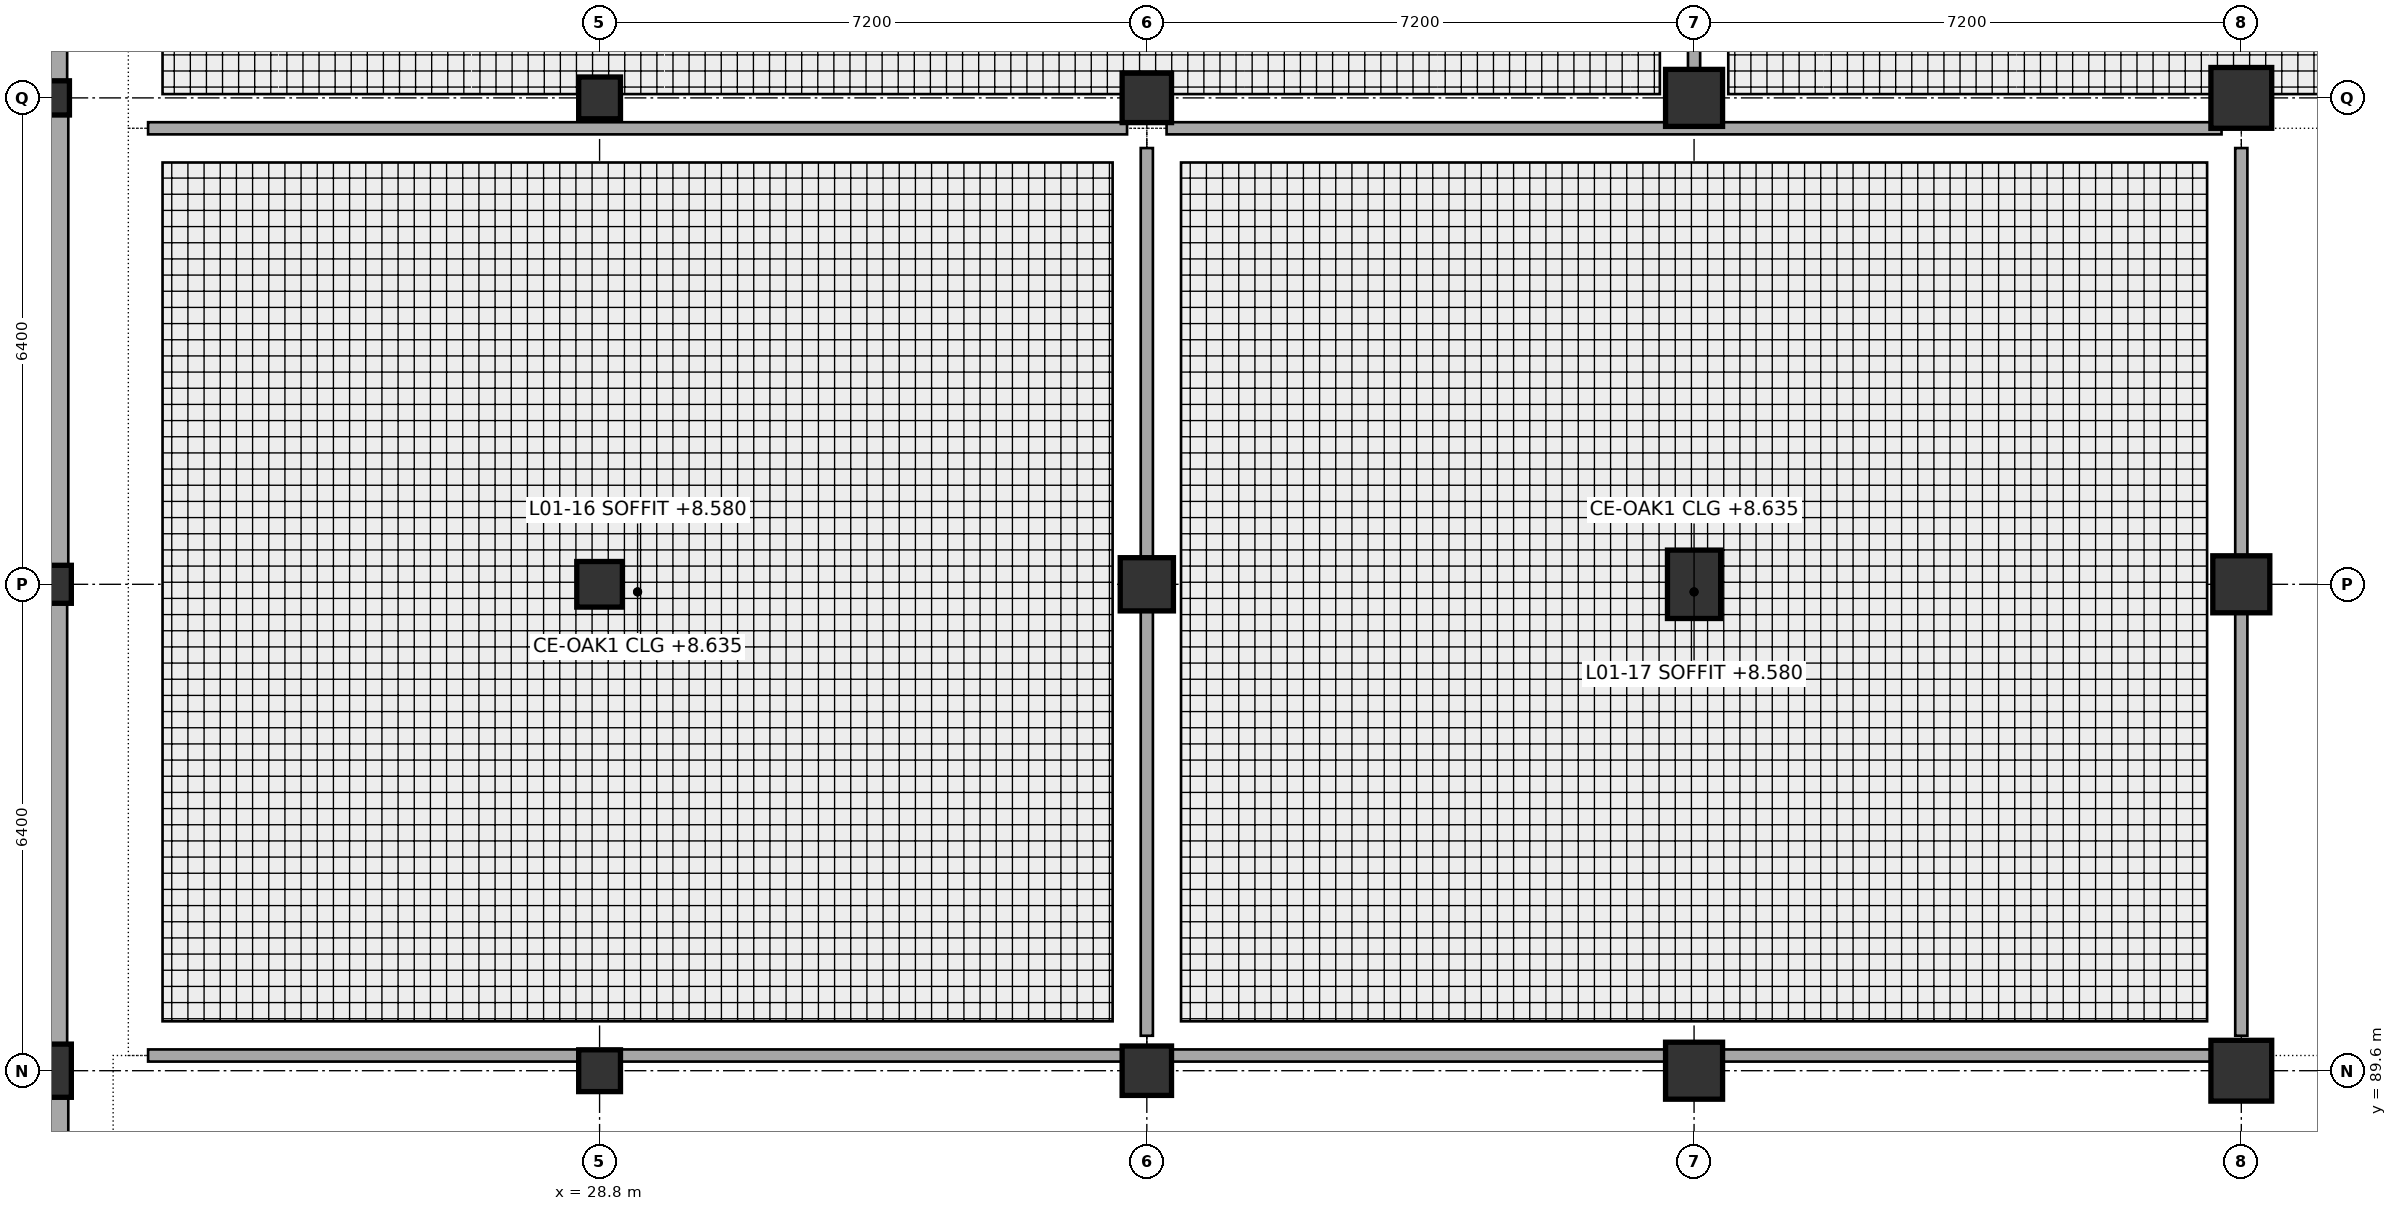
"""IFC4 building model, lengths in metres.
Left out: names, types, materials, properties, quantities, classifications, styles, units other than length and angle.
Written with IfcOpenShell. Run it as: python <this file> out.ifc"""

import sys

from ifc_helpers import new_model, si_unit, direction, frame, frame_2d, origin, origin_2d, place, context, subcontext, project, spatial, rectangle, extrude, element, fill, save


model = new_model("IFC4")
c1 = context("Model", 3, precision=1e-05, world=origin(), true_north=direction((0.0, 1.0)))
c2 = subcontext(c1, "Body", "Model", "MODEL_VIEW")
j1 = project(units=[si_unit("LENGTHUNIT", "METRE"), si_unit("PLANEANGLEUNIT", "RADIAN")], contexts=[c1])
p1 = place(None, origin())
s1 = spatial("IfcSite", under=j1, at=p1, CompositionType="ELEMENT")
p2 = place(p1, origin())
s2 = spatial("IfcBuilding", under=s1, at=p2, CompositionType="ELEMENT")
p3 = place(p2, frame((0.0, 0.0, 4.8)))
s3 = spatial("IfcBuildingStorey", under=s2, at=p3, CompositionType="ELEMENT", Elevation=4.8)
p4 = place(p3, frame((21.6, 89.6, 0.0), z_axis=(0.0, 0.0, 1.0), x_axis=(1.0, 0.0, 0.0)))
e1 = element("IfcColumn", 1, at=p4, inside=s3, PredefinedType="COLUMN", context=c2, shape_type="SweptSolid", body=[
    extrude(rectangle(XDim=0.5, YDim=0.7, at=origin_2d()), origin(), (0.0, 0.0, 1.0), 4.2),
])
p5 = place(p3, frame((21.6, 96.0, 0.0), z_axis=(0.0, 0.0, 1.0), x_axis=(1.0, 0.0, 0.0)))
e2 = element("IfcColumn", 2, at=p5, inside=s3, PredefinedType="COLUMN", context=c2, shape_type="SweptSolid", body=[
    extrude(rectangle(XDim=0.5, YDim=0.5, at=origin_2d()), origin(), (0.0, 0.0, 1.0), 4.2),
])
p6 = place(p3, frame((21.6, 102.4, 0.0), z_axis=(0.0, 0.0, 1.0), x_axis=(1.0, 0.0, 0.0)))
e3 = element("IfcColumn", 3, at=p6, inside=s3, PredefinedType="COLUMN", context=c2, shape_type="SweptSolid", body=[
    extrude(rectangle(XDim=0.45, YDim=0.45, at=origin_2d()), origin(), (0.0, 0.0, 1.0), 4.2),
])
p7 = place(p3, frame((28.8, 89.6, 0.0), z_axis=(0.0, 0.0, 1.0), x_axis=(1.0, 0.0, 0.0)))
e4 = element("IfcColumn", 4, at=p7, inside=s3, PredefinedType="COLUMN", context=c2, shape_type="SweptSolid", body=[
    extrude(rectangle(XDim=0.55, YDim=0.55, at=origin_2d()), origin(), (0.0, 0.0, 1.0), 4.2),
])
p8 = place(p3, frame((28.8, 96.0, 0.0), z_axis=(0.0, 0.0, 1.0), x_axis=(1.0, 0.0, 0.0)))
e5 = element("IfcColumn", 5, at=p8, inside=s3, PredefinedType="COLUMN", context=c2, shape_type="SweptSolid", body=[
    extrude(rectangle(XDim=0.6, YDim=0.6, at=origin_2d()), origin(), (0.0, 0.0, 1.0), 4.2),
])
p9 = place(p3, frame((28.8, 102.4, 0.0), z_axis=(0.0, 0.0, 1.0), x_axis=(1.0, 0.0, 0.0)))
e6 = element("IfcColumn", 6, at=p9, inside=s3, PredefinedType="COLUMN", context=c2, shape_type="SweptSolid", body=[
    extrude(rectangle(XDim=0.55, YDim=0.55, at=origin_2d()), origin(), (0.0, 0.0, 1.0), 4.2),
])
p10 = place(p3, frame((36.0, 89.6, 0.0), z_axis=(0.0, 0.0, 1.0), x_axis=(1.0, 0.0, 0.0)))
e7 = element("IfcColumn", 7, at=p10, inside=s3, PredefinedType="COLUMN", context=c2, shape_type="SweptSolid", body=[
    extrude(rectangle(XDim=0.65, YDim=0.65, at=origin_2d()), origin(), (0.0, 0.0, 1.0), 4.2),
])
p11 = place(p3, frame((36.0, 96.0, 0.0), z_axis=(0.0, 0.0, 1.0), x_axis=(1.0, 0.0, 0.0)))
e8 = element("IfcColumn", 8, at=p11, inside=s3, PredefinedType="COLUMN", context=c2, shape_type="SweptSolid", body=[
    extrude(rectangle(XDim=0.7, YDim=0.7, at=origin_2d()), origin(), (0.0, 0.0, 1.0), 4.2),
])
p12 = place(p3, frame((36.0, 102.4, 0.0), z_axis=(0.0, 0.0, 1.0), x_axis=(1.0, 0.0, 0.0)))
e9 = element("IfcColumn", 9, at=p12, inside=s3, PredefinedType="COLUMN", context=c2, shape_type="SweptSolid", body=[
    extrude(rectangle(XDim=0.65, YDim=0.65, at=origin_2d()), origin(), (0.0, 0.0, 1.0), 4.2),
])
p13 = place(p3, frame((43.2, 89.6, 0.0), z_axis=(0.0, 0.0, 1.0), x_axis=(1.0, 0.0, 0.0)))
e10 = element("IfcColumn", 10, at=p13, inside=s3, PredefinedType="COLUMN", context=c2, shape_type="SweptSolid", body=[
    extrude(rectangle(XDim=0.75, YDim=0.75, at=origin_2d()), origin(), (0.0, 0.0, 1.0), 4.2),
])
p14 = place(p3, frame((43.2, 96.0, 0.0), z_axis=(0.0, 0.0, 1.0), x_axis=(1.0, 0.0, 0.0)))
e11 = element("IfcColumn", 11, at=p14, inside=s3, PredefinedType="COLUMN", context=c2, shape_type="SweptSolid", body=[
    extrude(rectangle(XDim=0.7, YDim=0.9, at=origin_2d()), origin(), (0.0, 0.0, 1.0), 4.2),
])
p15 = place(p3, frame((43.2, 102.4, 0.0), z_axis=(0.0, 0.0, 1.0), x_axis=(1.0, 0.0, 0.0)))
e12 = element("IfcColumn", 12, at=p15, inside=s3, PredefinedType="COLUMN", context=c2, shape_type="SweptSolid", body=[
    extrude(rectangle(XDim=0.75, YDim=0.75, at=origin_2d()), origin(), (0.0, 0.0, 1.0), 4.2),
])
p16 = place(p3, frame((50.4, 89.6, 0.0), z_axis=(0.0, 0.0, 1.0), x_axis=(1.0, 0.0, 0.0)))
e13 = element("IfcColumn", 13, at=p16, inside=s3, PredefinedType="COLUMN", context=c2, shape_type="SweptSolid", body=[
    extrude(rectangle(XDim=0.8, YDim=0.8, at=origin_2d()), origin(), (0.0, 0.0, 1.0), 4.2),
])
p17 = place(p3, frame((50.4, 96.0, 0.0), z_axis=(0.0, 0.0, 1.0), x_axis=(1.0, 0.0, 0.0)))
e14 = element("IfcColumn", 14, at=p17, inside=s3, PredefinedType="COLUMN", context=c2, shape_type="SweptSolid", body=[
    extrude(rectangle(XDim=0.75, YDim=0.75, at=origin_2d()), origin(), (0.0, 0.0, 1.0), 4.2),
])
p18 = place(p3, frame((50.4, 102.4, 0.0), z_axis=(0.0, 0.0, 1.0), x_axis=(1.0, 0.0, 0.0)))
e15 = element("IfcColumn", 15, at=p18, inside=s3, PredefinedType="COLUMN", context=c2, shape_type="SweptSolid", body=[
    extrude(rectangle(XDim=0.8, YDim=0.8, at=origin_2d()), origin(), (0.0, 0.0, 1.0), 4.2),
])
p19 = place(p3, frame((21.6, 83.2, 0.0), z_axis=(0.0, 0.0, 1.0), x_axis=(0.0, 1.0, 0.0)))
e16 = element("IfcWall", 16, at=p19, inside=s3, PredefinedType="STANDARD", context=c2, shape_type="SweptSolid", body=[
    extrude(rectangle(XDim=6.4, YDim=0.42, at=frame_2d((3.2, 0.0))), origin(), (0.0, 0.0, 1.0), 3.84),
])
p20 = place(p19, frame((2.3, 0.0, 0.8)))
e17 = element("IfcOpeningElement", 17, at=p20, cuts=e16, PredefinedType="OPENING", context=c2, shape_type="SweptSolid", body=[
    extrude(rectangle(XDim=1.8, YDim=1.45, at=frame_2d((0.9, 0.725))), frame((0.0, 0.22, 0.0), z_axis=(0.0, -1.0, 0.0), x_axis=(1.0, 0.0, 0.0)), (0.0, 0.0, 1.0), 0.44),
])
p21 = place(p3, frame((21.6, 89.6, 0.0), z_axis=(0.0, 0.0, 1.0), x_axis=(0.0, 1.0, 0.0)))
e18 = element("IfcWall", 18, at=p21, inside=s3, PredefinedType="STANDARD", context=c2, shape_type="SweptSolid", body=[
    extrude(rectangle(XDim=6.4, YDim=0.39, at=frame_2d((3.2, 0.0))), origin(), (0.0, 0.0, 1.0), 2.89),
])
p22 = place(p21, frame((2.15, 0.0, 0.8)))
e19 = element("IfcOpeningElement", 19, at=p22, cuts=e18, PredefinedType="OPENING", context=c2, shape_type="SweptSolid", body=[
    extrude(rectangle(XDim=2.1, YDim=1.45, at=frame_2d((1.05, 0.725))), frame((0.0, 0.205, 0.0), z_axis=(0.0, -1.0, 0.0), x_axis=(1.0, 0.0, 0.0)), (0.0, 0.0, 1.0), 0.41),
])
p23 = place(p3, frame((21.6, 96.0, 0.0), z_axis=(0.0, 0.0, 1.0), x_axis=(0.0, 1.0, 0.0)))
e20 = element("IfcWall", 20, at=p23, inside=s3, PredefinedType="STANDARD", context=c2, shape_type="SweptSolid", body=[
    extrude(rectangle(XDim=6.4, YDim=0.42, at=frame_2d((3.2, 0.0))), origin(), (0.0, 0.0, 1.0), 3.84),
])
p24 = place(p23, frame((2.0, 0.0, 0.8)))
e21 = element("IfcOpeningElement", 21, at=p24, cuts=e20, PredefinedType="OPENING", context=c2, shape_type="SweptSolid", body=[
    extrude(rectangle(XDim=2.4, YDim=1.45, at=frame_2d((1.2, 0.725))), frame((0.0, 0.22, 0.0), z_axis=(0.0, -1.0, 0.0), x_axis=(1.0, 0.0, 0.0)), (0.0, 0.0, 1.0), 0.44),
])
p25 = place(p3, frame((21.6, 102.4, 0.0), z_axis=(0.0, 0.0, 1.0), x_axis=(0.0, 1.0, 0.0)))
e22 = element("IfcWall", 22, at=p25, inside=s3, PredefinedType="STANDARD", context=c2, shape_type="SweptSolid", body=[
    extrude(rectangle(XDim=6.4, YDim=0.39, at=frame_2d((3.2, 0.0))), origin(), (0.0, 0.0, 1.0), 2.74),
])
p26 = place(p25, frame((1.8, 0.0, 0.8)))
e23 = element("IfcOpeningElement", 23, at=p26, cuts=e22, PredefinedType="OPENING", context=c2, shape_type="SweptSolid", body=[
    extrude(rectangle(XDim=2.8, YDim=1.6, at=frame_2d((1.4, 0.8))), frame((0.0, 0.205, 0.0), z_axis=(0.0, -1.0, 0.0), x_axis=(1.0, 0.0, 0.0)), (0.0, 0.0, 1.0), 0.41),
])
p27 = place(p3, frame((22.86, 89.8, 0.0), z_axis=(0.0, 0.0, 1.0), x_axis=(1.0, 0.0, 0.0)))
e24 = element("IfcWall", 24, at=p27, inside=s3, PredefinedType="PARTITIONING", context=c2, shape_type="SweptSolid", body=[
    extrude(rectangle(XDim=12.88, YDim=0.16, at=frame_2d((6.44, 0.0))), origin(), (0.0, 0.0, 1.0), 2.915),
])
p28 = place(p27, frame((6.64, 0.0, 0.0)))
e25 = element("IfcOpeningElement", 25, at=p28, cuts=e24, PredefinedType="OPENING", context=c2, shape_type="SweptSolid", body=[
    extrude(rectangle(XDim=1.2, YDim=2.15, at=frame_2d((0.6, 1.075))), frame((0.0, 0.09, 0.0), z_axis=(0.0, -1.0, 0.0), x_axis=(1.0, 0.0, 0.0)), (0.0, 0.0, 1.0), 0.18),
])
p29 = place(p3, frame((36.0, 90.06, 0.0), z_axis=(0.0, 0.0, 1.0), x_axis=(0.0, 1.0, 0.0)))
e26 = element("IfcWall", 26, at=p29, inside=s3, PredefinedType="PARTITIONING", context=c2, shape_type="SweptSolid", body=[
    extrude(rectangle(XDim=11.68, YDim=0.16, at=frame_2d((5.84, 0.0))), origin(), (0.0, 0.0, 1.0), 2.665),
])
p30 = place(p3, frame((35.74, 102.0, 0.0), z_axis=(0.0, 0.0, 1.0), x_axis=(-1.0, 0.0, 0.0)))
e27 = element("IfcWall", 27, at=p30, inside=s3, PredefinedType="PARTITIONING", context=c2, shape_type="SweptSolid", body=[
    extrude(rectangle(XDim=12.88, YDim=0.16, at=frame_2d((6.44, 0.0))), origin(), (0.0, 0.0, 1.0), 3.165),
])
p31 = place(p3, frame((36.26, 89.8, 0.0), z_axis=(0.0, 0.0, 1.0), x_axis=(1.0, 0.0, 0.0)))
e28 = element("IfcWall", 28, at=p31, inside=s3, PredefinedType="PARTITIONING", context=c2, shape_type="SweptSolid", body=[
    extrude(rectangle(XDim=13.88, YDim=0.16, at=frame_2d((6.94, 0.0))), origin(), (0.0, 0.0, 1.0), 3.165),
])
p32 = place(p31, frame((7.94, 0.0, 0.0)))
e29 = element("IfcOpeningElement", 29, at=p32, cuts=e28, PredefinedType="OPENING", context=c2, shape_type="SweptSolid", body=[
    extrude(rectangle(XDim=1.2, YDim=2.15, at=frame_2d((0.6, 1.075))), frame((0.0, 0.09, 0.0), z_axis=(0.0, -1.0, 0.0), x_axis=(1.0, 0.0, 0.0)), (0.0, 0.0, 1.0), 0.18),
])
p33 = place(p3, frame((50.4, 90.06, 0.0), z_axis=(0.0, 0.0, 1.0), x_axis=(0.0, 1.0, 0.0)))
e30 = element("IfcWall", 30, at=p33, inside=s3, PredefinedType="PARTITIONING", context=c2, shape_type="SweptSolid", body=[
    extrude(rectangle(XDim=11.68, YDim=0.16, at=frame_2d((5.84, 0.0))), origin(), (0.0, 0.0, 1.0), 2.615),
])
p34 = place(p3, frame((50.14, 102.0, 0.0), z_axis=(0.0, 0.0, 1.0), x_axis=(-1.0, 0.0, 0.0)))
e31 = element("IfcWall", 31, at=p34, inside=s3, PredefinedType="PARTITIONING", context=c2, shape_type="SweptSolid", body=[
    extrude(rectangle(XDim=13.88, YDim=0.16, at=frame_2d((6.94, 0.0))), origin(), (0.0, 0.0, 1.0), 3.065),
])
p35 = place(p3, frame((43.2, 102.26, 0.0), z_axis=(0.0, 0.0, 1.0), x_axis=(0.0, 1.0, 0.0)))
e32 = element("IfcWall", 32, at=p35, inside=s3, PredefinedType="PARTITIONING", context=c2, shape_type="SweptSolid", body=[
    extrude(rectangle(XDim=11.68, YDim=0.16, at=frame_2d((5.84, 0.0))), origin(), (0.0, 0.0, 1.0), 2.615),
])
p36 = place(p35, frame((4.44, 0.0, 0.0)))
e33 = element("IfcOpeningElement", 33, at=p36, cuts=e32, PredefinedType="OPENING", context=c2, shape_type="SweptSolid", body=[
    extrude(rectangle(XDim=1.2, YDim=2.15, at=frame_2d((0.6, 1.075))), frame((0.0, 0.09, 0.0), z_axis=(0.0, -1.0, 0.0), x_axis=(1.0, 0.0, 0.0)), (0.0, 0.0, 1.0), 0.18),
])
p37 = place(p22, origin())
e34 = element("IfcWindow", 34, at=p37, inside=s3, PartitioningType="SINGLE_PANEL", PredefinedType="WINDOW", context=c2, shape_type="SweptSolid", body=[
    extrude(rectangle(XDim=2.1, YDim=1.45, at=frame_2d((1.05, 0.725))), frame((0.0, 0.03, 0.0), z_axis=(0.0, -1.0, 0.0), x_axis=(1.0, 0.0, 0.0)), (0.0, 0.0, 1.0), 0.06),
])
fill(e19, e34)
p38 = place(p24, origin())
e35 = element("IfcWindow", 35, at=p38, inside=s3, PartitioningType="TRIPLE_PANEL_VERTICAL", PredefinedType="WINDOW", context=c2, shape_type="SweptSolid", body=[
    extrude(rectangle(XDim=2.4, YDim=1.45, at=frame_2d((1.2, 0.725))), frame((0.0, 0.03, 0.0), z_axis=(0.0, -1.0, 0.0), x_axis=(1.0, 0.0, 0.0)), (0.0, 0.0, 1.0), 0.06),
])
fill(e21, e35)
p39 = place(p28, origin())
e36 = element("IfcDoor", 36, at=p39, inside=s3, OperationType="SINGLE_SWING_LEFT", PredefinedType="DOOR", context=c2, shape_type="SweptSolid", body=[
    extrude(rectangle(XDim=1.2, YDim=2.15, at=frame_2d((0.6, 1.075))), frame((0.0, 0.025, 0.0), z_axis=(0.0, -1.0, 0.0), x_axis=(1.0, 0.0, 0.0)), (0.0, 0.0, 1.0), 0.05),
])
fill(e25, e36)
p40 = place(p32, origin())
e37 = element("IfcDoor", 37, at=p40, inside=s3, OperationType="SINGLE_SWING_RIGHT", PredefinedType="DOOR", context=c2, shape_type="SweptSolid", body=[
    extrude(rectangle(XDim=1.2, YDim=2.15, at=frame_2d((0.6, 1.075))), frame((0.0, 0.025, 0.0), z_axis=(0.0, -1.0, 0.0), x_axis=(1.0, 0.0, 0.0)), (0.0, 0.0, 1.0), 0.05),
])
fill(e29, e37)
save(model, sys.argv[1])
